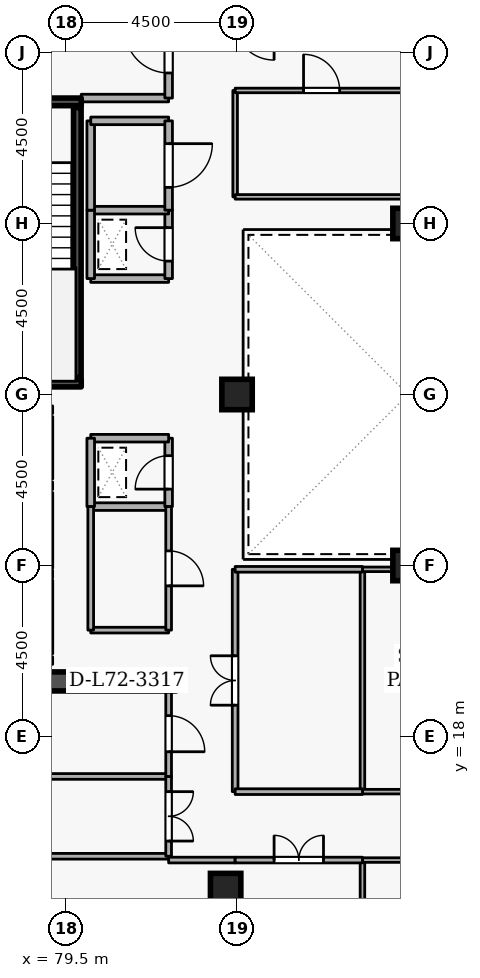
"""IFC4 building model, lengths in metres.
Left out: names, types, materials, properties, quantities, classifications, styles, units other than length and angle.
Written with IfcOpenShell. Run it as: python <this file> out.ifc"""

import sys

from ifc_helpers import new_model, si_unit, direction, frame, frame_2d, origin, origin_2d, place, context, subcontext, project, spatial, rectangle, extrude, element, fill, save


model = new_model("IFC4")
c1 = context("Model", 3, precision=1e-05, world=origin(), true_north=direction((0.0, 1.0)))
c2 = subcontext(c1, "Body", "Model", "MODEL_VIEW")
j1 = project(units=[si_unit("LENGTHUNIT", "METRE"), si_unit("PLANEANGLEUNIT", "RADIAN")], contexts=[c1])
p1 = place(None, origin())
s1 = spatial("IfcSite", under=j1, at=p1, CompositionType="ELEMENT")
p2 = place(p1, origin())
s2 = spatial("IfcBuilding", under=s1, at=p2, CompositionType="ELEMENT")
p3 = place(p2, frame((0.0, 0.0, 269.1)))
s3 = spatial("IfcBuildingStorey", under=s2, at=p3, CompositionType="ELEMENT", Elevation=269.1)
p4 = place(p3, frame((76.6, 19.45, 0.0), z_axis=(0.0, 0.0, 1.0), x_axis=(1.0, 0.0, 0.0)))
e1 = element("IfcWall", 1, at=p4, inside=s3, PredefinedType="SHEAR", context=c2, shape_type="SweptSolid", body=[
    extrude(rectangle(XDim=5.8, YDim=0.5, at=frame_2d((2.9, 0.0))), origin(), (0.0, 0.0, 1.0), 3.6),
])
for number, where, z_axis, x_axis in (
    (2, (83.7, 14.0, 0.0), (0.0, 0.0, 1.0), (1.0, 0.0, 0.0)),
    (3, (84.0, 27.0, 0.0), (0.0, 0.0, 1.0), (1.0, 0.0, 0.0)),
    (4, (88.5, 22.5, 0.0), (0.0, 0.0, 1.0), (1.0, 0.0, 0.0)),
    (5, (88.5, 31.5, 0.0), (0.0, 0.0, 1.0), (1.0, 0.0, 0.0)),
):
    element("IfcColumn", number, at=place(p3, frame(where, z_axis=z_axis, x_axis=x_axis)), inside=s3, PredefinedType="COLUMN", context=c2, shape_type="SweptSolid", body=[
        extrude(rectangle(XDim=0.8, YDim=0.8, at=origin_2d()), origin(), (0.0, 0.0, 1.0), 3.6),
    ])
p5 = place(p3, frame((79.05, 24.78, 0.0), z_axis=(0.0, 0.0, 1.0), x_axis=(0.0, 1.0, 0.0)))
e6 = element("IfcWall", 6, at=p5, inside=s3, PredefinedType="STANDARD", context=c2, shape_type="SweptSolid", body=[
    extrude(rectangle(XDim=1.64, YDim=0.2, at=frame_2d((0.82, 0.0))), origin(), (0.0, 0.0, 1.0), 3.34),
])
p6 = place(p5, frame((0.31, 0.0, 0.0)))
e7 = element("IfcOpeningElement", 7, at=p6, cuts=e6, PredefinedType="OPENING", context=c2, shape_type="SweptSolid", body=[
    extrude(rectangle(XDim=1.02, YDim=2.06, at=frame_2d((0.51, 1.03))), frame((0.0, 0.11, 0.0), z_axis=(0.0, -1.0, 0.0), x_axis=(1.0, 0.0, 0.0)), (0.0, 0.0, 1.0), 0.22),
])
p7 = place(p3, frame((79.05, 22.43, 0.0), z_axis=(0.0, 0.0, 1.0), x_axis=(0.0, 1.0, 0.0)))
e8 = element("IfcWall", 8, at=p7, inside=s3, PredefinedType="STANDARD", context=c2, shape_type="SweptSolid", body=[
    extrude(rectangle(XDim=1.99, YDim=0.2, at=frame_2d((0.995, 0.0))), origin(), (0.0, 0.0, 1.0), 3.34),
])
p8 = place(p7, frame((0.485, 0.0, 0.0)))
e9 = element("IfcOpeningElement", 9, at=p8, cuts=e8, PredefinedType="OPENING", context=c2, shape_type="SweptSolid", body=[
    extrude(rectangle(XDim=1.02, YDim=2.06, at=frame_2d((0.51, 1.03))), frame((0.0, 0.11, 0.0), z_axis=(0.0, -1.0, 0.0), x_axis=(1.0, 0.0, 0.0)), (0.0, 0.0, 1.0), 0.22),
])
p9 = place(p3, frame((79.05, 20.18, 0.0), z_axis=(0.0, 0.0, 1.0), x_axis=(0.0, 1.0, 0.0)))
e10 = element("IfcWall", 10, at=p9, inside=s3, PredefinedType="STANDARD", context=c2, shape_type="SweptSolid", body=[
    extrude(rectangle(XDim=1.94, YDim=0.2, at=frame_2d((0.97, 0.0))), origin(), (0.0, 0.0, 1.0), 3.34),
])
p10 = place(p9, frame((0.46, 0.0, 0.0)))
e11 = element("IfcOpeningElement", 11, at=p10, cuts=e10, PredefinedType="OPENING", context=c2, shape_type="SweptSolid", body=[
    extrude(rectangle(XDim=1.02, YDim=2.06, at=frame_2d((0.51, 1.03))), frame((0.0, 0.11, 0.0), z_axis=(0.0, -1.0, 0.0), x_axis=(1.0, 0.0, 0.0)), (0.0, 0.0, 1.0), 0.22),
])
p11 = place(p3, frame((76.55, 34.7, 0.0), z_axis=(0.0, 0.0, 1.0), x_axis=(1.0, 0.0, 0.0)))
e12 = element("IfcWall", 12, at=p11, inside=s3, PredefinedType="SHEAR", context=c2, shape_type="SweptSolid", body=[
    extrude(rectangle(XDim=3.35, YDim=0.2, at=frame_2d((1.675, 0.0))), origin(), (0.0, 0.0, 1.0), 3.6),
])
p12 = place(p11, frame((1.125, 0.0, 0.0)))
e13 = element("IfcOpeningElement", 13, at=p12, cuts=e12, PredefinedType="OPENING", context=c2, shape_type="SweptSolid", body=[
    extrude(rectangle(XDim=1.1, YDim=2.1, at=frame_2d((0.55, 1.05))), frame((0.0, 0.11, 0.0), z_axis=(0.0, -1.0, 0.0), x_axis=(1.0, 0.0, 0.0)), (0.0, 0.0, 1.0), 0.22),
])
p13 = place(p3, frame((79.9, 27.3, 0.0), z_axis=(0.0, 0.0, 1.0), x_axis=(-1.0, 0.0, 0.0)))
e14 = element("IfcWall", 14, at=p13, inside=s3, PredefinedType="SHEAR", context=c2, shape_type="SweptSolid", body=[
    extrude(rectangle(XDim=3.35, YDim=0.2, at=frame_2d((1.675, 0.0))), origin(), (0.0, 0.0, 1.0), 3.6),
])
p14 = place(p3, frame((79.797, 27.45, 0.0), z_axis=(0.0, 0.0, 1.0), x_axis=(0.0, 1.0, 0.0)))
e15 = element("IfcWall", 15, at=p14, inside=s3, PredefinedType="SHEAR", context=c2, shape_type="SweptSolid", body=[
    extrude(rectangle(XDim=7.1, YDim=0.2, at=frame_2d((3.55, 0.0))), origin(), (0.0, 0.0, 1.0), 3.6),
])
p15 = place(p3, frame((79.9, 34.8, 0.0), z_axis=(0.0, 0.0, 1.0), x_axis=(1.0, 0.0, 0.0)))
e16 = element("IfcWall", 16, at=p15, inside=s3, PredefinedType="STANDARD", context=c2, shape_type="SweptSolid", body=[
    extrude(rectangle(XDim=2.3, YDim=0.2, at=frame_2d((1.15, 0.0))), origin(), (0.0, 0.0, 1.0), 2.545),
])
p16 = place(p3, frame((82.2, 34.8, 0.0), z_axis=(0.0, 0.0, 1.0), x_axis=(0.0, 1.0, 0.0)))
e17 = element("IfcWall", 17, at=p16, inside=s3, PredefinedType="STANDARD", context=c2, shape_type="SweptSolid", body=[
    extrude(rectangle(XDim=2.5, YDim=0.2, at=frame_2d((1.25, 0.0))), origin(), (0.0, 0.0, 1.0), 3.34),
])
p17 = place(p16, frame((0.66, 0.0, 0.0)))
e18 = element("IfcOpeningElement", 18, at=p17, cuts=e17, PredefinedType="OPENING", context=c2, shape_type="SweptSolid", body=[
    extrude(rectangle(XDim=1.15, YDim=2.1, at=frame_2d((0.575, 1.05))), frame((0.0, 0.11, 0.0), z_axis=(0.0, -1.0, 0.0), x_axis=(1.0, 0.0, 0.0)), (0.0, 0.0, 1.0), 0.22),
])
p18 = place(p3, frame((80.15, 24.05, 0.0), z_axis=(0.0, 0.0, 1.0), x_axis=(1.0, 0.0, 0.0)))
e19 = element("IfcWall", 19, at=p18, inside=s3, PredefinedType="STANDARD", context=c2, shape_type="SweptSolid", body=[
    extrude(rectangle(XDim=2.05, YDim=0.2, at=frame_2d((1.025, 0.0))), origin(), (0.0, 0.0, 1.0), 3.34),
])
p19 = place(p3, frame((82.2, 24.05, 0.0), z_axis=(0.0, 0.0, 1.0), x_axis=(0.0, 1.0, 0.0)))
e20 = element("IfcWall", 20, at=p19, inside=s3, PredefinedType="STANDARD", context=c2, shape_type="SweptSolid", body=[
    extrude(rectangle(XDim=1.8, YDim=0.2, at=frame_2d((0.9, 0.0))), origin(), (0.0, 0.0, 1.0), 3.34),
])
p20 = place(p19, frame((0.46, 0.0, 0.0)))
e21 = element("IfcOpeningElement", 21, at=p20, cuts=e20, PredefinedType="OPENING", context=c2, shape_type="SweptSolid", body=[
    extrude(rectangle(XDim=0.88, YDim=2.04, at=frame_2d((0.44, 1.02))), frame((0.0, 0.11, 0.0), z_axis=(0.0, -1.0, 0.0), x_axis=(1.0, 0.0, 0.0)), (0.0, 0.0, 1.0), 0.22),
])
p21 = place(p3, frame((82.2, 25.85, 0.0), z_axis=(0.0, 0.0, 1.0), x_axis=(-1.0, 0.0, 0.0)))
e22 = element("IfcWall", 22, at=p21, inside=s3, PredefinedType="STANDARD", context=c2, shape_type="SweptSolid", body=[
    extrude(rectangle(XDim=2.05, YDim=0.2, at=frame_2d((1.025, 0.0))), origin(), (0.0, 0.0, 1.0), 3.34),
])
p22 = place(p3, frame((80.15, 25.85, 0.0), z_axis=(0.0, 0.0, 1.0), x_axis=(0.0, -1.0, 0.0)))
e23 = element("IfcWall", 23, at=p22, inside=s3, PredefinedType="STANDARD", context=c2, shape_type="SweptSolid", body=[
    extrude(rectangle(XDim=1.8, YDim=0.2, at=frame_2d((0.9, 0.0))), origin(), (0.0, 0.0, 1.0), 3.34),
])
p23 = place(p3, frame((80.15, 30.05, 0.0), z_axis=(0.0, 0.0, 1.0), x_axis=(1.0, 0.0, 0.0)))
e24 = element("IfcWall", 24, at=p23, inside=s3, PredefinedType="STANDARD", context=c2, shape_type="SweptSolid", body=[
    extrude(rectangle(XDim=2.05, YDim=0.2, at=frame_2d((1.025, 0.0))), origin(), (0.0, 0.0, 1.0), 3.34),
])
p24 = place(p3, frame((82.2, 30.05, 0.0), z_axis=(0.0, 0.0, 1.0), x_axis=(0.0, 1.0, 0.0)))
e25 = element("IfcWall", 25, at=p24, inside=s3, PredefinedType="STANDARD", context=c2, shape_type="SweptSolid", body=[
    extrude(rectangle(XDim=1.8, YDim=0.2, at=frame_2d((0.9, 0.0))), origin(), (0.0, 0.0, 1.0), 3.34),
])
p25 = place(p24, frame((0.46, 0.0, 0.0)))
e26 = element("IfcOpeningElement", 26, at=p25, cuts=e25, PredefinedType="OPENING", context=c2, shape_type="SweptSolid", body=[
    extrude(rectangle(XDim=0.88, YDim=2.04, at=frame_2d((0.44, 1.02))), frame((0.0, 0.11, 0.0), z_axis=(0.0, -1.0, 0.0), x_axis=(1.0, 0.0, 0.0)), (0.0, 0.0, 1.0), 0.22),
])
p26 = place(p3, frame((82.2, 31.85, 0.0), z_axis=(0.0, 0.0, 1.0), x_axis=(-1.0, 0.0, 0.0)))
e27 = element("IfcWall", 27, at=p26, inside=s3, PredefinedType="STANDARD", context=c2, shape_type="SweptSolid", body=[
    extrude(rectangle(XDim=2.05, YDim=0.2, at=frame_2d((1.025, 0.0))), origin(), (0.0, 0.0, 1.0), 3.34),
])
p27 = place(p3, frame((80.15, 31.85, 0.0), z_axis=(0.0, 0.0, 1.0), x_axis=(0.0, -1.0, 0.0)))
e28 = element("IfcWall", 28, at=p27, inside=s3, PredefinedType="STANDARD", context=c2, shape_type="SweptSolid", body=[
    extrude(rectangle(XDim=1.8, YDim=0.2, at=frame_2d((0.9, 0.0))), origin(), (0.0, 0.0, 1.0), 3.34),
])
p28 = place(p3, frame((80.15, 31.85, 0.0), z_axis=(0.0, 0.0, 1.0), x_axis=(0.0, 1.0, 0.0)))
e29 = element("IfcWall", 29, at=p28, inside=s3, PredefinedType="STANDARD", context=c2, shape_type="SweptSolid", body=[
    extrude(rectangle(XDim=2.35, YDim=0.2, at=frame_2d((1.175, 0.0))), origin(), (0.0, 0.0, 1.0), 3.34),
])
p29 = place(p3, frame((80.15, 34.2, 0.0), z_axis=(0.0, 0.0, 1.0), x_axis=(1.0, 0.0, 0.0)))
e30 = element("IfcWall", 30, at=p29, inside=s3, PredefinedType="STANDARD", context=c2, shape_type="SweptSolid", body=[
    extrude(rectangle(XDim=2.05, YDim=0.2, at=frame_2d((1.025, 0.0))), origin(), (0.0, 0.0, 1.0), 2.545),
])
p30 = place(p3, frame((82.2, 34.2, 0.0), z_axis=(0.0, 0.0, 1.0), x_axis=(0.0, -1.0, 0.0)))
e31 = element("IfcWall", 31, at=p30, inside=s3, PredefinedType="STANDARD", context=c2, shape_type="SweptSolid", body=[
    extrude(rectangle(XDim=2.35, YDim=0.2, at=frame_2d((1.175, 0.0))), origin(), (0.0, 0.0, 1.0), 3.34),
])
p31 = place(p30, frame((0.6, 0.0, 0.0)))
e32 = element("IfcOpeningElement", 32, at=p31, cuts=e31, PredefinedType="OPENING", context=c2, shape_type="SweptSolid", body=[
    extrude(rectangle(XDim=1.15, YDim=2.1, at=frame_2d((0.575, 1.05))), frame((0.0, 0.11, 0.0), z_axis=(0.0, -1.0, 0.0), x_axis=(1.0, 0.0, 0.0)), (0.0, 0.0, 1.0), 0.22),
])
p32 = place(p3, frame((82.2, 20.8, 0.0), z_axis=(0.0, 0.0, 1.0), x_axis=(-1.0, 0.0, 0.0)))
e33 = element("IfcWall", 33, at=p32, inside=s3, PredefinedType="PARTITIONING", context=c2, shape_type="SweptSolid", body=[
    extrude(rectangle(XDim=2.05, YDim=0.15, at=frame_2d((1.025, 0.0))), origin(), (0.0, 0.0, 1.0), 3.34),
])
p33 = place(p3, frame((80.15, 20.8, 0.0), z_axis=(0.0, 0.0, 1.0), x_axis=(0.0, 1.0, 0.0)))
e34 = element("IfcWall", 34, at=p33, inside=s3, PredefinedType="PARTITIONING", context=c2, shape_type="SweptSolid", body=[
    extrude(rectangle(XDim=3.25, YDim=0.15, at=frame_2d((1.625, 0.0))), origin(), (0.0, 0.0, 1.0), 3.34),
])
p34 = place(p3, frame((82.2, 24.05, 0.0), z_axis=(0.0, 0.0, 1.0), x_axis=(0.0, -1.0, 0.0)))
e35 = element("IfcWall", 35, at=p34, inside=s3, PredefinedType="PARTITIONING", context=c2, shape_type="SweptSolid", body=[
    extrude(rectangle(XDim=3.25, YDim=0.15, at=frame_2d((1.625, 0.0))), origin(), (0.0, 0.0, 1.0), 3.34),
])
p35 = place(p34, frame((1.165, 0.0, 0.0)))
e36 = element("IfcOpeningElement", 36, at=p35, cuts=e35, PredefinedType="OPENING", context=c2, shape_type="SweptSolid", body=[
    extrude(rectangle(XDim=0.92, YDim=2.08, at=frame_2d((0.46, 1.04))), frame((0.0, 0.085, 0.0), z_axis=(0.0, -1.0, 0.0), x_axis=(1.0, 0.0, 0.0)), (0.0, 0.0, 1.0), 0.17),
])
for number, where, z_axis, x_axis in (
    (37, (82.2, 14.85, 0.0), (0.0, 0.0, 1.0), (-1.0, 0.0, 0.0)),
    (38, (70.78, 16.95, 0.0), (0.0, 0.0, 1.0), (1.0, 0.0, 0.0)),
):
    element("IfcWall", number, at=place(p3, frame(where, z_axis=z_axis, x_axis=x_axis)), inside=s3, PredefinedType="PARTITIONING", context=c2, shape_type="SweptSolid", body=[
        extrude(rectangle(XDim=11.42, YDim=0.15, at=frame_2d((5.71, 0.0))), origin(), (0.0, 0.0, 1.0), 3.34),
    ])
p36 = place(p3, frame((82.2, 16.95, 0.0), z_axis=(0.0, 0.0, 1.0), x_axis=(0.0, -1.0, 0.0)))
e39 = element("IfcWall", 39, at=p36, inside=s3, PredefinedType="PARTITIONING", context=c2, shape_type="SweptSolid", body=[
    extrude(rectangle(XDim=2.1, YDim=0.15, at=frame_2d((1.05, 0.0))), origin(), (0.0, 0.0, 1.0), 3.34),
])
p37 = place(p36, frame((0.4, 0.0, 0.0)))
e40 = element("IfcOpeningElement", 40, at=p37, cuts=e39, PredefinedType="OPENING", context=c2, shape_type="SweptSolid", body=[
    extrude(rectangle(XDim=1.3, YDim=2.12, at=frame_2d((0.65, 1.06))), frame((0.0, 0.085, 0.0), z_axis=(0.0, -1.0, 0.0), x_axis=(1.0, 0.0, 0.0)), (0.0, 0.0, 1.0), 0.17),
])
p38 = place(p3, frame((82.2, 19.2, 0.0), z_axis=(0.0, 0.0, 1.0), x_axis=(0.0, -1.0, 0.0)))
e41 = element("IfcWall", 41, at=p38, inside=s3, PredefinedType="PARTITIONING", context=c2, shape_type="SweptSolid", body=[
    extrude(rectangle(XDim=2.25, YDim=0.15, at=frame_2d((1.125, 0.0))), origin(), (0.0, 0.0, 1.0), 3.34),
])
p39 = place(p38, frame((0.65, 0.0, 0.0)))
e42 = element("IfcOpeningElement", 42, at=p39, cuts=e41, PredefinedType="OPENING", context=c2, shape_type="SweptSolid", body=[
    extrude(rectangle(XDim=0.95, YDim=2.1, at=frame_2d((0.475, 1.05))), frame((0.0, 0.085, 0.0), z_axis=(0.0, -1.0, 0.0), x_axis=(1.0, 0.0, 0.0)), (0.0, 0.0, 1.0), 0.17),
])
p40 = place(p3, frame((87.3, 9.28, 0.0), z_axis=(0.0, 0.0, 1.0), x_axis=(0.0, 1.0, 0.0)))
e43 = element("IfcWall", 43, at=p40, inside=s3, PredefinedType="PARTITIONING", context=c2, shape_type="SweptSolid", body=[
    extrude(rectangle(XDim=5.47, YDim=0.12, at=frame_2d((2.735, 0.0))), origin(), (0.0, 0.0, 1.0), 3.34),
])
p41 = place(p3, frame((87.3, 14.75, 0.0), z_axis=(0.0, 0.0, 1.0), x_axis=(1.0, 0.0, 0.0)))
e44 = element("IfcWall", 44, at=p41, inside=s3, PredefinedType="PARTITIONING", context=c2, shape_type="SweptSolid", body=[
    extrude(rectangle(XDim=5.75, YDim=0.12, at=frame_2d((2.875, 0.0))), origin(), (0.0, 0.0, 1.0), 3.34),
])
p42 = place(p41, frame((2.35, 0.0, 0.0)))
e45 = element("IfcOpeningElement", 45, at=p42, cuts=e44, PredefinedType="OPENING", context=c2, shape_type="SweptSolid", body=[
    extrude(rectangle(XDim=1.05, YDim=2.1, at=frame_2d((0.525, 1.05))), frame((0.0, 0.07, 0.0), z_axis=(0.0, -1.0, 0.0), x_axis=(1.0, 0.0, 0.0)), (0.0, 0.0, 1.0), 0.14),
])
p43 = place(p3, frame((82.2, 14.75, 0.0), z_axis=(0.0, 0.0, 1.0), x_axis=(1.0, 0.0, 0.0)))
e46 = element("IfcWall", 46, at=p43, inside=s3, PredefinedType="PARTITIONING", context=c2, shape_type="SweptSolid", body=[
    extrude(rectangle(XDim=1.75, YDim=0.15, at=frame_2d((0.875, 0.0))), origin(), (0.0, 0.0, 1.0), 3.34),
])
p44 = place(p3, frame((83.95, 14.75, 0.0), z_axis=(0.0, 0.0, 1.0), x_axis=(1.0, 0.0, 0.0)))
e47 = element("IfcWall", 47, at=p44, inside=s3, PredefinedType="PARTITIONING", context=c2, shape_type="SweptSolid", body=[
    extrude(rectangle(XDim=3.35, YDim=0.15, at=frame_2d((1.675, 0.0))), origin(), (0.0, 0.0, 1.0), 3.34),
])
p45 = place(p44, frame((1.025, 0.0, 0.0)))
e48 = element("IfcOpeningElement", 48, at=p45, cuts=e47, PredefinedType="OPENING", context=c2, shape_type="SweptSolid", body=[
    extrude(rectangle(XDim=1.3, YDim=2.12, at=frame_2d((0.65, 1.06))), frame((0.0, 0.085, 0.0), z_axis=(0.0, -1.0, 0.0), x_axis=(1.0, 0.0, 0.0)), (0.0, 0.0, 1.0), 0.17),
])
p46 = place(p3, frame((87.3, 16.55, 0.0), z_axis=(0.0, 0.0, 1.0), x_axis=(0.0, 1.0, 0.0)))
e49 = element("IfcWall", 49, at=p46, inside=s3, PredefinedType="PARTITIONING", context=c2, shape_type="SweptSolid", body=[
    extrude(rectangle(XDim=5.85, YDim=0.12, at=frame_2d((2.925, 0.0))), origin(), (0.0, 0.0, 1.0), 3.34),
])
for number, where, z_axis, x_axis in (
    (50, (87.3, 22.4, 0.0), (0.0, 0.0, 1.0), (1.0, 0.0, 0.0)),
    (51, (93.05, 16.55, 0.0), (0.0, 0.0, 1.0), (-1.0, 0.0, 0.0)),
):
    element("IfcWall", number, at=place(p3, frame(where, z_axis=z_axis, x_axis=x_axis)), inside=s3, PredefinedType="PARTITIONING", context=c2, shape_type="SweptSolid", body=[
        extrude(rectangle(XDim=5.75, YDim=0.12, at=frame_2d((2.875, 0.0))), origin(), (0.0, 0.0, 1.0), 3.34),
    ])
p47 = place(p3, frame((83.95, 16.55, 0.0), z_axis=(0.0, 0.0, 1.0), x_axis=(0.0, 1.0, 0.0)))
e52 = element("IfcWall", 52, at=p47, inside=s3, PredefinedType="PARTITIONING", context=c2, shape_type="SweptSolid", body=[
    extrude(rectangle(XDim=5.85, YDim=0.15, at=frame_2d((2.925, 0.0))), origin(), (0.0, 0.0, 1.0), 3.34),
])
p48 = place(p47, frame((2.275, 0.0, 0.0)))
e53 = element("IfcOpeningElement", 53, at=p48, cuts=e52, PredefinedType="OPENING", context=c2, shape_type="SweptSolid", body=[
    extrude(rectangle(XDim=1.3, YDim=2.12, at=frame_2d((0.65, 1.06))), frame((0.0, 0.085, 0.0), z_axis=(0.0, -1.0, 0.0), x_axis=(1.0, 0.0, 0.0)), (0.0, 0.0, 1.0), 0.17),
])
for number, where, z_axis, x_axis in (
    (54, (83.95, 22.4, 0.0), (0.0, 0.0, 1.0), (1.0, 0.0, 0.0)),
    (55, (87.3, 16.55, 0.0), (0.0, 0.0, 1.0), (-1.0, 0.0, 0.0)),
):
    element("IfcWall", number, at=place(p3, frame(where, z_axis=z_axis, x_axis=x_axis)), inside=s3, PredefinedType="PARTITIONING", context=c2, shape_type="SweptSolid", body=[
        extrude(rectangle(XDim=3.35, YDim=0.15, at=frame_2d((1.675, 0.0))), origin(), (0.0, 0.0, 1.0), 3.34),
    ])
p49 = place(p3, frame((83.95, 32.2, 0.0), z_axis=(0.0, 0.0, 1.0), x_axis=(0.0, 1.0, 0.0)))
e56 = element("IfcWall", 56, at=p49, inside=s3, PredefinedType="PARTITIONING", context=c2, shape_type="SweptSolid", body=[
    extrude(rectangle(XDim=2.8, YDim=0.12, at=frame_2d((1.4, 0.0))), origin(), (0.0, 0.0, 1.0), 3.34),
])
p50 = place(p3, frame((83.95, 35.0, 0.0), z_axis=(0.0, 0.0, 1.0), x_axis=(1.0, 0.0, 0.0)))
e57 = element("IfcWall", 57, at=p50, inside=s3, PredefinedType="PARTITIONING", context=c2, shape_type="SweptSolid", body=[
    extrude(rectangle(XDim=4.55, YDim=0.12, at=frame_2d((2.275, 0.0))), origin(), (0.0, 0.0, 1.0), 3.34),
])
p51 = place(p50, frame((1.8, 0.0, 0.0)))
e58 = element("IfcOpeningElement", 58, at=p51, cuts=e57, PredefinedType="OPENING", context=c2, shape_type="SweptSolid", body=[
    extrude(rectangle(XDim=0.95, YDim=2.1, at=frame_2d((0.475, 1.05))), frame((0.0, 0.07, 0.0), z_axis=(0.0, -1.0, 0.0), x_axis=(1.0, 0.0, 0.0)), (0.0, 0.0, 1.0), 0.14),
])
p52 = place(p3, frame((88.5, 32.2, 0.0), z_axis=(0.0, 0.0, 1.0), x_axis=(-1.0, 0.0, 0.0)))
e59 = element("IfcWall", 59, at=p52, inside=s3, PredefinedType="PARTITIONING", context=c2, shape_type="SweptSolid", body=[
    extrude(rectangle(XDim=4.55, YDim=0.12, at=frame_2d((2.275, 0.0))), origin(), (0.0, 0.0, 1.0), 3.34),
])
p53 = place(p17, origin())
e60 = element("IfcDoor", 60, at=p53, inside=s3, OperationType="SINGLE_SWING_RIGHT", PredefinedType="DOOR", context=c2, shape_type="SweptSolid", body=[
    extrude(rectangle(XDim=1.15, YDim=2.1, at=frame_2d((0.575, 1.05))), frame((0.0, 0.025, 0.0), z_axis=(0.0, -1.0, 0.0), x_axis=(1.0, 0.0, 0.0)), (0.0, 0.0, 1.0), 0.05),
])
fill(e18, e60)
p54 = place(p20, origin())
e61 = element("IfcDoor", 61, at=p54, inside=s3, OperationType="SINGLE_SWING_LEFT", PredefinedType="DOOR", context=c2, shape_type="SweptSolid", body=[
    extrude(rectangle(XDim=0.88, YDim=2.04, at=frame_2d((0.44, 1.02))), frame((0.0, 0.025, 0.0), z_axis=(0.0, -1.0, 0.0), x_axis=(1.0, 0.0, 0.0)), (0.0, 0.0, 1.0), 0.05),
])
fill(e21, e61)
p55 = place(p25, origin())
e62 = element("IfcDoor", 62, at=p55, inside=s3, OperationType="SINGLE_SWING_RIGHT", PredefinedType="DOOR", context=c2, shape_type="SweptSolid", body=[
    extrude(rectangle(XDim=0.88, YDim=2.04, at=frame_2d((0.44, 1.02))), frame((0.0, 0.025, 0.0), z_axis=(0.0, -1.0, 0.0), x_axis=(1.0, 0.0, 0.0)), (0.0, 0.0, 1.0), 0.05),
])
fill(e26, e62)
p56 = place(p35, origin())
e63 = element("IfcDoor", 63, at=p56, inside=s3, OperationType="SINGLE_SWING_RIGHT", PredefinedType="DOOR", context=c2, shape_type="SweptSolid", body=[
    extrude(rectangle(XDim=0.92, YDim=2.08, at=frame_2d((0.46, 1.04))), frame((0.0, 0.025, 0.0), z_axis=(0.0, -1.0, 0.0), x_axis=(1.0, 0.0, 0.0)), (0.0, 0.0, 1.0), 0.05),
])
fill(e36, e63)
p57 = place(p31, origin())
e64 = element("IfcDoor", 64, at=p57, inside=s3, OperationType="SINGLE_SWING_LEFT", PredefinedType="DOOR", context=c2, shape_type="SweptSolid", body=[
    extrude(rectangle(XDim=1.15, YDim=2.1, at=frame_2d((0.575, 1.05))), frame((0.0, 0.025, 0.0), z_axis=(0.0, -1.0, 0.0), x_axis=(1.0, 0.0, 0.0)), (0.0, 0.0, 1.0), 0.05),
])
fill(e32, e64)
p58 = place(p37, origin())
e65 = element("IfcDoor", 65, at=p58, inside=s3, OperationType="DOUBLE_DOOR_SINGLE_SWING", PredefinedType="DOOR", context=c2, shape_type="SweptSolid", body=[
    extrude(rectangle(XDim=1.3, YDim=2.12, at=frame_2d((0.65, 1.06))), frame((0.0, 0.025, 0.0), z_axis=(0.0, -1.0, 0.0), x_axis=(1.0, 0.0, 0.0)), (0.0, 0.0, 1.0), 0.05),
])
fill(e40, e65)
p59 = place(p39, origin())
e66 = element("IfcDoor", 66, at=p59, inside=s3, OperationType="SINGLE_SWING_RIGHT", PredefinedType="DOOR", context=c2, shape_type="SweptSolid", body=[
    extrude(rectangle(XDim=0.95, YDim=2.1, at=frame_2d((0.475, 1.05))), frame((0.0, 0.025, 0.0), z_axis=(0.0, -1.0, 0.0), x_axis=(1.0, 0.0, 0.0)), (0.0, 0.0, 1.0), 0.05),
])
fill(e42, e66)
p60 = place(p45, origin())
e67 = element("IfcDoor", 67, at=p60, inside=s3, OperationType="DOUBLE_DOOR_SINGLE_SWING", PredefinedType="DOOR", context=c2, shape_type="SweptSolid", body=[
    extrude(rectangle(XDim=1.3, YDim=2.12, at=frame_2d((0.65, 1.06))), frame((0.0, 0.025, 0.0), z_axis=(0.0, -1.0, 0.0), x_axis=(1.0, 0.0, 0.0)), (0.0, 0.0, 1.0), 0.05),
])
fill(e48, e67)
p61 = place(p48, origin())
e68 = element("IfcDoor", 68, at=p61, inside=s3, OperationType="DOUBLE_DOOR_SINGLE_SWING", PredefinedType="DOOR", context=c2, shape_type="SweptSolid", body=[
    extrude(rectangle(XDim=1.3, YDim=2.12, at=frame_2d((0.65, 1.06))), frame((0.0, 0.025, 0.0), z_axis=(0.0, -1.0, 0.0), x_axis=(1.0, 0.0, 0.0)), (0.0, 0.0, 1.0), 0.05),
])
fill(e53, e68)
p62 = place(p51, origin())
e69 = element("IfcDoor", 69, at=p62, inside=s3, OperationType="SINGLE_SWING_LEFT", PredefinedType="DOOR", context=c2, shape_type="SweptSolid", body=[
    extrude(rectangle(XDim=0.95, YDim=2.1, at=frame_2d((0.475, 1.05))), frame((0.0, 0.025, 0.0), z_axis=(0.0, -1.0, 0.0), x_axis=(1.0, 0.0, 0.0)), (0.0, 0.0, 1.0), 0.05),
])
fill(e58, e69)
save(model, sys.argv[1])
